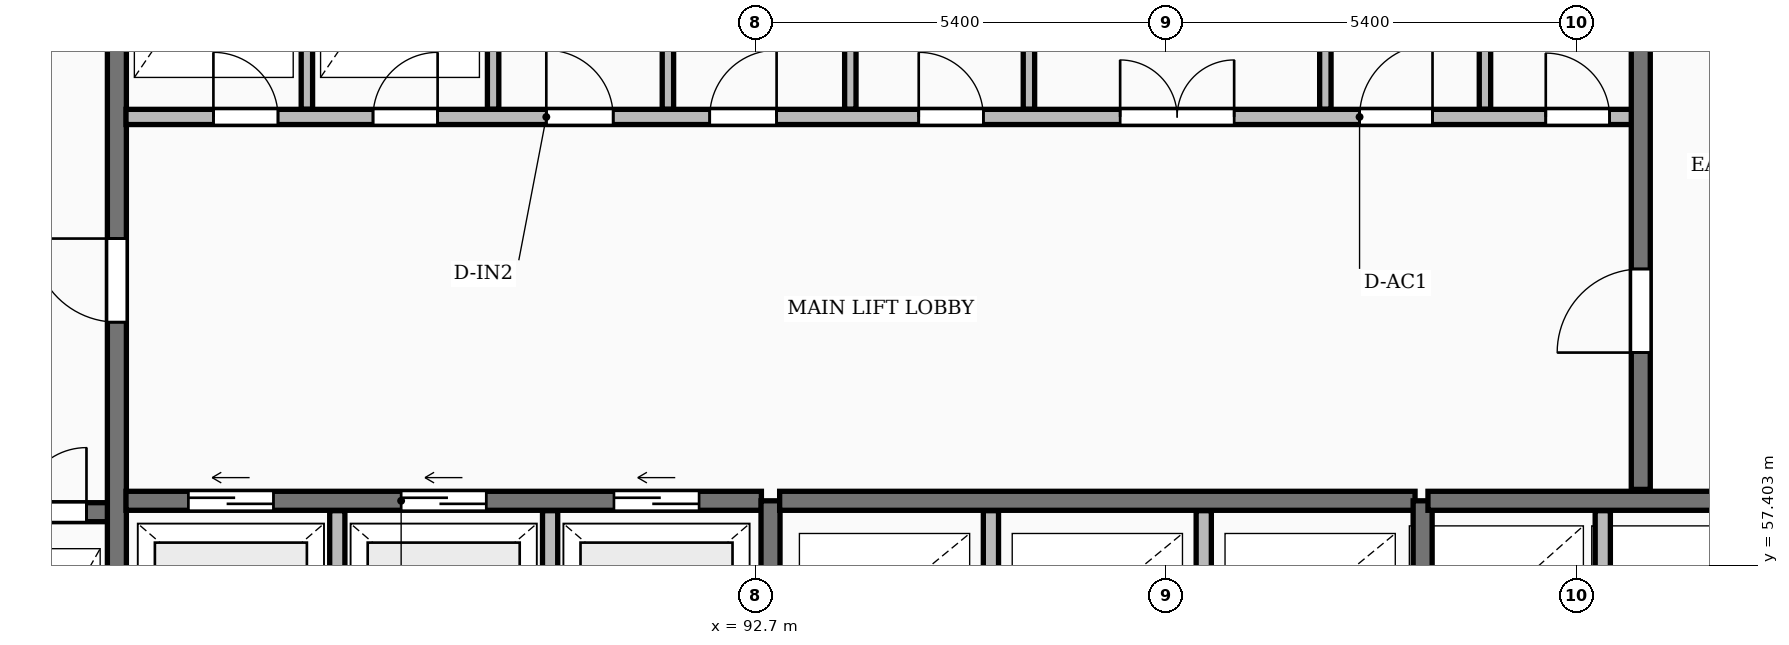
"""IFC4 building model, lengths in metres.
Left out: names, types, materials, properties, quantities, classifications, styles, units other than length and angle.
Written with IfcOpenShell. Run it as: python <this file> out.ifc"""

import sys

from ifc_helpers import new_model, si_unit, direction, frame, frame_2d, origin, place, context, subcontext, project, spatial, rectangle, extrude, element, fill, save


model = new_model("IFC4")
c1 = context("Model", 3, precision=1e-05, world=origin(), true_north=direction((0.0, 1.0)))
c2 = subcontext(c1, "Body", "Model", "MODEL_VIEW")
j1 = project(units=[si_unit("LENGTHUNIT", "METRE"), si_unit("PLANEANGLEUNIT", "RADIAN")], contexts=[c1])
p1 = place(None, origin())
s1 = spatial("IfcSite", under=j1, at=p1, CompositionType="ELEMENT")
p2 = place(p1, origin())
s2 = spatial("IfcBuilding", under=s1, at=p2, CompositionType="ELEMENT")
p3 = place(p2, frame((0.0, 0.0, 5.4)))
s3 = spatial("IfcBuildingStorey", under=s2, at=p3, CompositionType="ELEMENT", Elevation=5.4)
p4 = place(p3, frame((79.79, 58.1, 0.0), z_axis=(0.0, 0.0, 1.0), x_axis=(1.0, 0.0, 0.0)))
e1 = element("IfcWall", 1, at=p4, inside=s3, PredefinedType="SHEAR", context=c2, shape_type="SweptSolid", body=[
    extrude(rectangle(XDim=4.39, YDim=0.25, at=frame_2d((2.195, 0.0))), origin(), (0.0, 0.0, 1.0), 4.6),
])
p5 = place(p4, frame((1.05, 0.0, 0.0)))
e2 = element("IfcOpeningElement", 2, at=p5, cuts=e1, PredefinedType="OPENING", context=c2, shape_type="SweptSolid", body=[
    extrude(rectangle(XDim=1.12, YDim=2.12, at=frame_2d((0.56, 1.06))), frame((0.0, 0.135, 0.0), z_axis=(0.0, -1.0, 0.0), x_axis=(1.0, 0.0, 0.0)), (0.0, 0.0, 1.0), 0.27),
])
p6 = place(p4, frame((3.26, 0.0, 0.0)))
e3 = element("IfcOpeningElement", 3, at=p6, cuts=e1, PredefinedType="OPENING", context=c2, shape_type="SweptSolid", body=[
    extrude(rectangle(XDim=0.85, YDim=2.05, at=frame_2d((0.425, 1.025))), frame((0.0, 0.135, 0.0), z_axis=(0.0, -1.0, 0.0), x_axis=(1.0, 0.0, 0.0)), (0.0, 0.0, 1.0), 0.27),
])
p7 = place(p3, frame((84.3, 55.4, 0.0), z_axis=(0.0, 0.0, 1.0), x_axis=(0.0, 1.0, 0.0)))
e4 = element("IfcWall", 4, at=p7, inside=s3, PredefinedType="SHEAR", context=c2, shape_type="SweptSolid", body=[
    extrude(rectangle(XDim=11.6, YDim=0.25, at=frame_2d((5.8, 0.0))), origin(), (0.0, 0.0, 1.0), 4.6),
])
p8 = place(p7, frame((5.2, 0.0, 0.0)))
e5 = element("IfcOpeningElement", 5, at=p8, cuts=e4, PredefinedType="OPENING", context=c2, shape_type="SweptSolid", body=[
    extrude(rectangle(XDim=1.1, YDim=2.1, at=frame_2d((0.55, 1.05))), frame((0.0, 0.135, 0.0), z_axis=(0.0, -1.0, 0.0), x_axis=(1.0, 0.0, 0.0)), (0.0, 0.0, 1.0), 0.27),
])
for number, where, z_axis, x_axis in (
    (6, (87.2, 55.4, 0.0), (0.0, 0.0, 1.0), (0.0, 1.0, 0.0)),
    (7, (90.0, 55.4, 0.0), (0.0, 0.0, 1.0), (0.0, 1.0, 0.0)),
):
    element("IfcWall", number, at=place(p3, frame(where, z_axis=z_axis, x_axis=x_axis)), inside=s3, PredefinedType="PARTITIONING", context=c2, shape_type="SweptSolid", body=[
        extrude(rectangle(XDim=2.72, YDim=0.2, at=frame_2d((1.36, 0.0))), origin(), (0.0, 0.0, 1.0), 4.3),
    ])
p9 = place(p3, frame((84.42, 58.25, 0.0), z_axis=(0.0, 0.0, 1.0), x_axis=(1.0, 0.0, 0.0)))
e8 = element("IfcWall", 8, at=p9, inside=s3, PredefinedType="SHEAR", context=c2, shape_type="SweptSolid", body=[
    extrude(rectangle(XDim=8.36, YDim=0.25, at=frame_2d((4.18, 0.0))), origin(), (0.0, 0.0, 1.0), 4.6),
])
p10 = place(p9, frame((0.82, 0.0, 0.0)))
e9 = element("IfcOpeningElement", 9, at=p10, cuts=e8, PredefinedType="OPENING", context=c2, shape_type="SweptSolid", body=[
    extrude(rectangle(XDim=1.12, YDim=2.12, at=frame_2d((0.56, 1.06))), frame((0.0, 0.135, 0.0), z_axis=(0.0, -1.0, 0.0), x_axis=(1.0, 0.0, 0.0)), (0.0, 0.0, 1.0), 0.27),
])
p11 = place(p9, frame((3.62, 0.0, 0.0)))
e10 = element("IfcOpeningElement", 10, at=p11, cuts=e8, PredefinedType="OPENING", context=c2, shape_type="SweptSolid", body=[
    extrude(rectangle(XDim=1.12, YDim=2.12, at=frame_2d((0.56, 1.06))), frame((0.0, 0.135, 0.0), z_axis=(0.0, -1.0, 0.0), x_axis=(1.0, 0.0, 0.0)), (0.0, 0.0, 1.0), 0.27),
])
p12 = place(p9, frame((6.42, 0.0, 0.0)))
e11 = element("IfcOpeningElement", 11, at=p12, cuts=e8, PredefinedType="OPENING", context=c2, shape_type="SweptSolid", body=[
    extrude(rectangle(XDim=1.12, YDim=2.12, at=frame_2d((0.56, 1.06))), frame((0.0, 0.135, 0.0), z_axis=(0.0, -1.0, 0.0), x_axis=(1.0, 0.0, 0.0)), (0.0, 0.0, 1.0), 0.27),
])
p13 = place(p3, frame((92.9, 55.4, 0.0), z_axis=(0.0, 0.0, 1.0), x_axis=(0.0, 1.0, 0.0)))
e12 = element("IfcWall", 12, at=p13, inside=s3, PredefinedType="SHEAR", context=c2, shape_type="SweptSolid", body=[
    extrude(rectangle(XDim=2.85, YDim=0.25, at=frame_2d((1.425, 0.0))), origin(), (0.0, 0.0, 1.0), 4.6),
])
for number, where, z_axis, x_axis in (
    (13, (95.8, 55.4, 0.0), (0.0, 0.0, 1.0), (0.0, 1.0, 0.0)),
    (14, (98.6, 55.4, 0.0), (0.0, 0.0, 1.0), (0.0, 1.0, 0.0)),
):
    element("IfcWall", number, at=place(p3, frame(where, z_axis=z_axis, x_axis=x_axis)), inside=s3, PredefinedType="PARTITIONING", context=c2, shape_type="SweptSolid", body=[
        extrude(rectangle(XDim=2.72, YDim=0.2, at=frame_2d((1.36, 0.0))), origin(), (0.0, 0.0, 1.0), 4.3),
    ])
p14 = place(p3, frame((93.02, 58.25, 0.0), z_axis=(0.0, 0.0, 1.0), x_axis=(1.0, 0.0, 0.0)))
e15 = element("IfcWall", 15, at=p14, inside=s3, PredefinedType="SHEAR", context=c2, shape_type="SweptSolid", body=[
    extrude(rectangle(XDim=8.36, YDim=0.25, at=frame_2d((4.18, 0.0))), origin(), (0.0, 0.0, 1.0), 4.6),
])
p15 = place(p3, frame((101.48, 55.4, 0.0), z_axis=(0.0, 0.0, 1.0), x_axis=(0.0, 1.0, 0.0)))
e16 = element("IfcWall", 16, at=p15, inside=s3, PredefinedType="SHEAR", context=c2, shape_type="SweptSolid", body=[
    extrude(rectangle(XDim=2.85, YDim=0.25, at=frame_2d((1.425, 0.0))), origin(), (0.0, 0.0, 1.0), 4.6),
])
p16 = place(p3, frame((103.85, 55.4, 0.0), z_axis=(0.0, 0.0, 1.0), x_axis=(0.0, 1.0, 0.0)))
e17 = element("IfcWall", 17, at=p16, inside=s3, PredefinedType="PARTITIONING", context=c2, shape_type="SweptSolid", body=[
    extrude(rectangle(XDim=2.72, YDim=0.2, at=frame_2d((1.36, 0.0))), origin(), (0.0, 0.0, 1.0), 4.3),
])
p17 = place(p3, frame((101.55, 58.25, 0.0), z_axis=(0.0, 0.0, 1.0), x_axis=(1.0, 0.0, 0.0)))
e18 = element("IfcWall", 18, at=p17, inside=s3, PredefinedType="SHEAR", context=c2, shape_type="SweptSolid", body=[
    extrude(rectangle(XDim=4.6, YDim=0.25, at=frame_2d((2.3, 0.0))), origin(), (0.0, 0.0, 1.0), 4.6),
])
for number, where, z_axis, x_axis in (
    (19, (86.8, 63.4, 0.0), (0.0, 0.0, 1.0), (0.0, 1.0, 0.0)),
    (20, (89.25, 63.4, 0.0), (0.0, 0.0, 1.0), (0.0, 1.0, 0.0)),
    (21, (91.55, 63.4, 0.0), (0.0, 0.0, 1.0), (0.0, 1.0, 0.0)),
):
    element("IfcWall", number, at=place(p3, frame(where, z_axis=z_axis, x_axis=x_axis)), inside=s3, PredefinedType="PARTITIONING", context=c2, shape_type="SweptSolid", body=[
        extrude(rectangle(XDim=3.6, YDim=0.15, at=frame_2d((1.8, 0.0))), origin(), (0.0, 0.0, 1.0), 4.3),
    ])
p18 = place(p3, frame((93.95, 63.4, 0.0), z_axis=(0.0, 0.0, 1.0), x_axis=(0.0, 1.0, 0.0)))
e22 = element("IfcWall", 22, at=p18, inside=s3, PredefinedType="PARTITIONING", context=c2, shape_type="SweptSolid", body=[
    extrude(rectangle(XDim=3.6, YDim=0.15, at=frame_2d((1.8, 0.0))), origin(), (0.0, 0.0, 1.0), 3.55),
])
for number, where, z_axis, x_axis in (
    (23, (102.3, 63.4, 0.0), (0.0, 0.0, 1.0), (0.0, 1.0, 0.0)),
    (24, (96.3, 63.4, 0.0), (0.0, 0.0, 1.0), (0.0, 1.0, 0.0)),
    (25, (100.2, 63.4, 0.0), (0.0, 0.0, 1.0), (0.0, 1.0, 0.0)),
):
    element("IfcWall", number, at=place(p3, frame(where, z_axis=z_axis, x_axis=x_axis)), inside=s3, PredefinedType="PARTITIONING", context=c2, shape_type="SweptSolid", body=[
        extrude(rectangle(XDim=3.6, YDim=0.15, at=frame_2d((1.8, 0.0))), origin(), (0.0, 0.0, 1.0), 4.3),
    ])
p19 = place(p3, frame((84.42, 63.3, 0.0), z_axis=(0.0, 0.0, 1.0), x_axis=(1.0, 0.0, 0.0)))
e26 = element("IfcWall", 26, at=p19, inside=s3, PredefinedType="PARTITIONING", context=c2, shape_type="SweptSolid", body=[
    extrude(rectangle(XDim=19.83, YDim=0.2, at=frame_2d((9.915, 0.0))), origin(), (0.0, 0.0, 1.0), 4.3),
])
p20 = place(p19, frame((1.15, 0.0, 0.0)))
e27 = element("IfcOpeningElement", 27, at=p20, cuts=e26, PredefinedType="OPENING", context=c2, shape_type="SweptSolid", body=[
    extrude(rectangle(XDim=0.85, YDim=2.05, at=frame_2d((0.425, 1.025))), frame((0.0, 0.11, 0.0), z_axis=(0.0, -1.0, 0.0), x_axis=(1.0, 0.0, 0.0)), (0.0, 0.0, 1.0), 0.22),
])
p21 = place(p19, frame((3.25, 0.0, 0.0)))
e28 = element("IfcOpeningElement", 28, at=p21, cuts=e26, PredefinedType="OPENING", context=c2, shape_type="SweptSolid", body=[
    extrude(rectangle(XDim=0.85, YDim=2.05, at=frame_2d((0.425, 1.025))), frame((0.0, 0.11, 0.0), z_axis=(0.0, -1.0, 0.0), x_axis=(1.0, 0.0, 0.0)), (0.0, 0.0, 1.0), 0.22),
])
p22 = place(p19, frame((13.08, 0.0, 0.0)))
e29 = element("IfcOpeningElement", 29, at=p22, cuts=e26, PredefinedType="OPENING", context=c2, shape_type="SweptSolid", body=[
    extrude(rectangle(XDim=1.5, YDim=2.2, at=frame_2d((0.75, 1.1))), frame((0.0, 0.11, 0.0), z_axis=(0.0, -1.0, 0.0), x_axis=(1.0, 0.0, 0.0)), (0.0, 0.0, 1.0), 0.22),
])
p23 = place(p19, frame((5.53, 0.0, 0.0)))
e30 = element("IfcOpeningElement", 30, at=p23, cuts=e26, PredefinedType="OPENING", context=c2, shape_type="SweptSolid", body=[
    extrude(rectangle(XDim=0.88, YDim=2.06, at=frame_2d((0.44, 1.03))), frame((0.0, 0.11, 0.0), z_axis=(0.0, -1.0, 0.0), x_axis=(1.0, 0.0, 0.0)), (0.0, 0.0, 1.0), 0.22),
])
p24 = place(p19, frame((7.68, 0.0, 0.0)))
e31 = element("IfcOpeningElement", 31, at=p24, cuts=e26, PredefinedType="OPENING", context=c2, shape_type="SweptSolid", body=[
    extrude(rectangle(XDim=0.88, YDim=2.06, at=frame_2d((0.44, 1.03))), frame((0.0, 0.11, 0.0), z_axis=(0.0, -1.0, 0.0), x_axis=(1.0, 0.0, 0.0)), (0.0, 0.0, 1.0), 0.22),
])
p25 = place(p19, frame((10.43, 0.0, 0.0)))
e32 = element("IfcOpeningElement", 32, at=p25, cuts=e26, PredefinedType="OPENING", context=c2, shape_type="SweptSolid", body=[
    extrude(rectangle(XDim=0.85, YDim=2.05, at=frame_2d((0.425, 1.025))), frame((0.0, 0.11, 0.0), z_axis=(0.0, -1.0, 0.0), x_axis=(1.0, 0.0, 0.0)), (0.0, 0.0, 1.0), 0.22),
])
p26 = place(p19, frame((16.23, 0.0, 0.0)))
e33 = element("IfcOpeningElement", 33, at=p26, cuts=e26, PredefinedType="OPENING", context=c2, shape_type="SweptSolid", body=[
    extrude(rectangle(XDim=0.96, YDim=2.1, at=frame_2d((0.48, 1.05))), frame((0.0, 0.11, 0.0), z_axis=(0.0, -1.0, 0.0), x_axis=(1.0, 0.0, 0.0)), (0.0, 0.0, 1.0), 0.22),
])
p27 = place(p19, frame((18.68, 0.0, 0.0)))
e34 = element("IfcOpeningElement", 34, at=p27, cuts=e26, PredefinedType="OPENING", context=c2, shape_type="SweptSolid", body=[
    extrude(rectangle(XDim=0.84, YDim=2.04, at=frame_2d((0.42, 1.02))), frame((0.0, 0.11, 0.0), z_axis=(0.0, -1.0, 0.0), x_axis=(1.0, 0.0, 0.0)), (0.0, 0.0, 1.0), 0.22),
])
p28 = place(p3, frame((104.35, 58.4, 0.0), z_axis=(0.0, 0.0, 1.0), x_axis=(0.0, 1.0, 0.0)))
e35 = element("IfcWall", 35, at=p28, inside=s3, PredefinedType="SHEAR", context=c2, shape_type="SweptSolid", body=[
    extrude(rectangle(XDim=8.6, YDim=0.25, at=frame_2d((4.3, 0.0))), origin(), (0.0, 0.0, 1.0), 4.6),
])
p29 = place(p28, frame((1.8, 0.0, 0.0)))
e36 = element("IfcOpeningElement", 36, at=p29, cuts=e35, PredefinedType="OPENING", context=c2, shape_type="SweptSolid", body=[
    extrude(rectangle(XDim=1.1, YDim=2.1, at=frame_2d((0.55, 1.05))), frame((0.0, 0.135, 0.0), z_axis=(0.0, -1.0, 0.0), x_axis=(1.0, 0.0, 0.0)), (0.0, 0.0, 1.0), 0.27),
])
p30 = place(p6, origin())
e37 = element("IfcDoor", 37, at=p30, inside=s3, OperationType="SINGLE_SWING_RIGHT", PredefinedType="DOOR", context=c2, shape_type="SweptSolid", body=[
    extrude(rectangle(XDim=0.85, YDim=2.05, at=frame_2d((0.425, 1.025))), frame((0.0, 0.025, 0.0), z_axis=(0.0, -1.0, 0.0), x_axis=(1.0, 0.0, 0.0)), (0.0, 0.0, 1.0), 0.05),
])
fill(e3, e37)
p31 = place(p8, origin())
e38 = element("IfcDoor", 38, at=p31, inside=s3, OperationType="SINGLE_SWING_RIGHT", PredefinedType="DOOR", context=c2, shape_type="SweptSolid", body=[
    extrude(rectangle(XDim=1.1, YDim=2.1, at=frame_2d((0.55, 1.05))), frame((0.0, 0.025, 0.0), z_axis=(0.0, -1.0, 0.0), x_axis=(1.0, 0.0, 0.0)), (0.0, 0.0, 1.0), 0.05),
])
fill(e5, e38)
p32 = place(p10, origin())
e39 = element("IfcDoor", 39, at=p32, inside=s3, OperationType="SLIDING_TO_LEFT", PredefinedType="DOOR", context=c2, shape_type="SweptSolid", body=[
    extrude(rectangle(XDim=1.12, YDim=2.12, at=frame_2d((0.56, 1.06))), frame((0.0, 0.025, 0.0), z_axis=(0.0, -1.0, 0.0), x_axis=(1.0, 0.0, 0.0)), (0.0, 0.0, 1.0), 0.05),
])
fill(e9, e39)
p33 = place(p11, origin())
e40 = element("IfcDoor", 40, at=p33, inside=s3, OperationType="SLIDING_TO_LEFT", PredefinedType="DOOR", context=c2, shape_type="SweptSolid", body=[
    extrude(rectangle(XDim=1.12, YDim=2.12, at=frame_2d((0.56, 1.06))), frame((0.0, 0.025, 0.0), z_axis=(0.0, -1.0, 0.0), x_axis=(1.0, 0.0, 0.0)), (0.0, 0.0, 1.0), 0.05),
])
fill(e10, e40)
p34 = place(p12, origin())
e41 = element("IfcDoor", 41, at=p34, inside=s3, OperationType="SLIDING_TO_LEFT", PredefinedType="DOOR", context=c2, shape_type="SweptSolid", body=[
    extrude(rectangle(XDim=1.12, YDim=2.12, at=frame_2d((0.56, 1.06))), frame((0.0, 0.025, 0.0), z_axis=(0.0, -1.0, 0.0), x_axis=(1.0, 0.0, 0.0)), (0.0, 0.0, 1.0), 0.05),
])
fill(e11, e41)
p35 = place(p20, origin())
e42 = element("IfcDoor", 42, at=p35, inside=s3, OperationType="SINGLE_SWING_LEFT", PredefinedType="DOOR", context=c2, shape_type="SweptSolid", body=[
    extrude(rectangle(XDim=0.85, YDim=2.05, at=frame_2d((0.425, 1.025))), frame((0.0, 0.025, 0.0), z_axis=(0.0, -1.0, 0.0), x_axis=(1.0, 0.0, 0.0)), (0.0, 0.0, 1.0), 0.05),
])
fill(e27, e42)
p36 = place(p21, origin())
e43 = element("IfcDoor", 43, at=p36, inside=s3, OperationType="SINGLE_SWING_RIGHT", PredefinedType="DOOR", context=c2, shape_type="SweptSolid", body=[
    extrude(rectangle(XDim=0.85, YDim=2.05, at=frame_2d((0.425, 1.025))), frame((0.0, 0.025, 0.0), z_axis=(0.0, -1.0, 0.0), x_axis=(1.0, 0.0, 0.0)), (0.0, 0.0, 1.0), 0.05),
])
fill(e28, e43)
p37 = place(p22, origin())
e44 = element("IfcDoor", 44, at=p37, inside=s3, OperationType="DOUBLE_DOOR_SINGLE_SWING", PredefinedType="DOOR", context=c2, shape_type="SweptSolid", body=[
    extrude(rectangle(XDim=1.5, YDim=2.2, at=frame_2d((0.75, 1.1))), frame((0.0, 0.025, 0.0), z_axis=(0.0, -1.0, 0.0), x_axis=(1.0, 0.0, 0.0)), (0.0, 0.0, 1.0), 0.05),
])
fill(e29, e44)
p38 = place(p23, origin())
e45 = element("IfcDoor", 45, at=p38, inside=s3, OperationType="SINGLE_SWING_LEFT", PredefinedType="DOOR", context=c2, shape_type="SweptSolid", body=[
    extrude(rectangle(XDim=0.88, YDim=2.06, at=frame_2d((0.44, 1.03))), frame((0.0, 0.025, 0.0), z_axis=(0.0, -1.0, 0.0), x_axis=(1.0, 0.0, 0.0)), (0.0, 0.0, 1.0), 0.05),
])
fill(e30, e45)
p39 = place(p24, origin())
e46 = element("IfcDoor", 46, at=p39, inside=s3, OperationType="SINGLE_SWING_RIGHT", PredefinedType="DOOR", context=c2, shape_type="SweptSolid", body=[
    extrude(rectangle(XDim=0.88, YDim=2.06, at=frame_2d((0.44, 1.03))), frame((0.0, 0.025, 0.0), z_axis=(0.0, -1.0, 0.0), x_axis=(1.0, 0.0, 0.0)), (0.0, 0.0, 1.0), 0.05),
])
fill(e31, e46)
p40 = place(p25, origin())
e47 = element("IfcDoor", 47, at=p40, inside=s3, OperationType="SINGLE_SWING_LEFT", PredefinedType="DOOR", context=c2, shape_type="SweptSolid", body=[
    extrude(rectangle(XDim=0.85, YDim=2.05, at=frame_2d((0.425, 1.025))), frame((0.0, 0.025, 0.0), z_axis=(0.0, -1.0, 0.0), x_axis=(1.0, 0.0, 0.0)), (0.0, 0.0, 1.0), 0.05),
])
fill(e32, e47)
p41 = place(p26, origin())
e48 = element("IfcDoor", 48, at=p41, inside=s3, OperationType="SINGLE_SWING_RIGHT", PredefinedType="DOOR", context=c2, shape_type="SweptSolid", body=[
    extrude(rectangle(XDim=0.96, YDim=2.1, at=frame_2d((0.48, 1.05))), frame((0.0, 0.025, 0.0), z_axis=(0.0, -1.0, 0.0), x_axis=(1.0, 0.0, 0.0)), (0.0, 0.0, 1.0), 0.05),
])
fill(e33, e48)
p42 = place(p27, origin())
e49 = element("IfcDoor", 49, at=p42, inside=s3, OperationType="SINGLE_SWING_LEFT", PredefinedType="DOOR", context=c2, shape_type="SweptSolid", body=[
    extrude(rectangle(XDim=0.84, YDim=2.04, at=frame_2d((0.42, 1.02))), frame((0.0, 0.025, 0.0), z_axis=(0.0, -1.0, 0.0), x_axis=(1.0, 0.0, 0.0)), (0.0, 0.0, 1.0), 0.05),
])
fill(e34, e49)
p43 = place(p29, origin())
e50 = element("IfcDoor", 50, at=p43, inside=s3, OperationType="SINGLE_SWING_LEFT", PredefinedType="DOOR", context=c2, shape_type="SweptSolid", body=[
    extrude(rectangle(XDim=1.1, YDim=2.1, at=frame_2d((0.55, 1.05))), frame((0.0, 0.025, 0.0), z_axis=(0.0, -1.0, 0.0), x_axis=(1.0, 0.0, 0.0)), (0.0, 0.0, 1.0), 0.05),
])
fill(e36, e50)
save(model, sys.argv[1])
